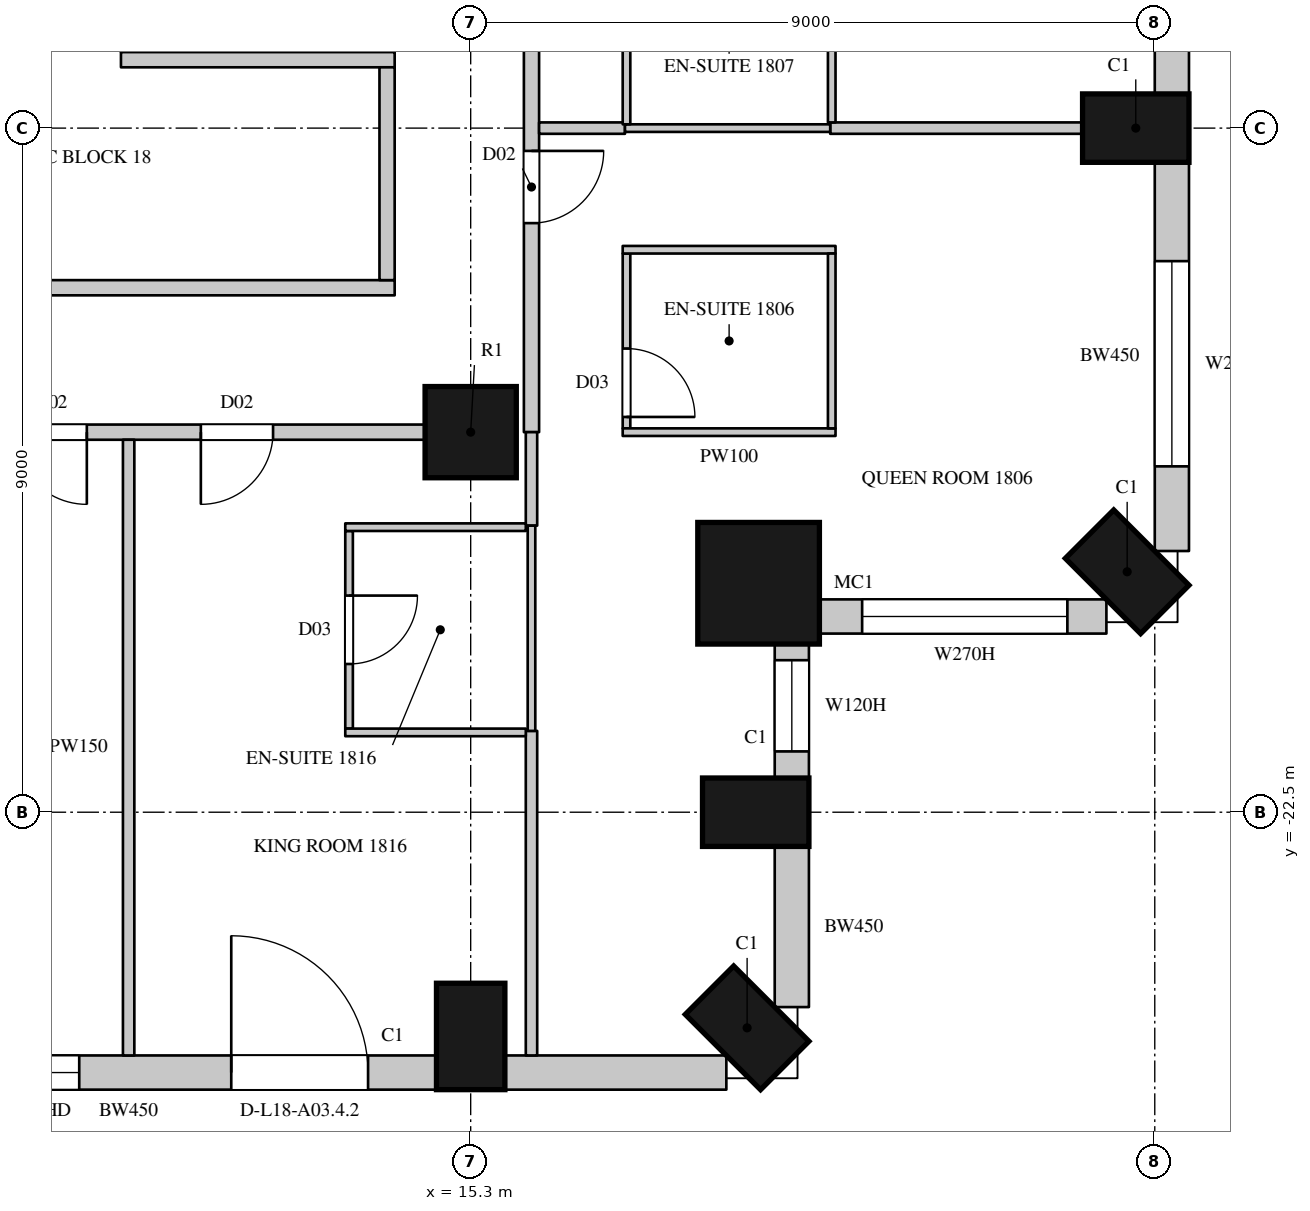
"""IFC4 building model, lengths in metres.
Left out: names, types, materials, properties, quantities, classifications, styles, units other than length and angle.
Written with IfcOpenShell. Run it as: python <this file> out.ifc"""

import sys

from ifc_helpers import new_model, si_unit, direction, frame, frame_2d, origin, origin_2d, place, context, subcontext, project, spatial, rectangle, circle, extrude, element, fill, save


model = new_model("IFC4")
c1 = context("Model", 3, precision=1e-05, world=origin(), true_north=direction((0.0, 1.0)))
c2 = subcontext(c1, "Body", "Model", "MODEL_VIEW")
j1 = project(units=[si_unit("LENGTHUNIT", "METRE"), si_unit("PLANEANGLEUNIT", "RADIAN")], contexts=[c1])
p1 = place(None, origin())
s1 = spatial("IfcSite", under=j1, at=p1, CompositionType="ELEMENT")
p2 = place(p1, origin())
s2 = spatial("IfcBuilding", under=s1, at=p2, CompositionType="ELEMENT")
p3 = place(p2, frame((0.0, 0.0, 95.1)))
s3 = spatial("IfcBuildingStorey", under=s2, at=p3, CompositionType="ELEMENT", Elevation=95.1)
for number, where, z_axis, x_axis in (
    (1, (15.3, -25.45, 0.0), (0.0, 0.0, 1.0), (1.0, 0.0, 0.0)),
    (2, (18.937, -25.337, 0.0), (0.0, 0.0, 1.0), (0.707, 0.707, 0.0)),
    (3, (19.05, -22.5, 0.0), (0.0, 0.0, 1.0), (0.0, 1.0, 0.0)),
):
    element("IfcColumn", number, at=place(p3, frame(where, z_axis=z_axis, x_axis=x_axis)), inside=s3, PredefinedType="COLUMN", context=c2, shape_type="SweptSolid", body=[
        extrude(rectangle(XDim=0.9, YDim=1.4, at=origin_2d()), origin(), (0.0, 0.0, 1.0), 3.6),
    ])
p4 = place(p3, frame((19.088, -19.488, 0.0), z_axis=(0.0, 0.0, 1.0), x_axis=(1.0, 0.0, 0.0)))
e4 = element("IfcColumn", 4, at=p4, inside=s3, PredefinedType="COLUMN", context=c2, shape_type="SweptSolid", body=[
    extrude(circle(Radius=0.8, at=origin_2d()), origin(), (0.0, 0.0, 1.0), 3.6),
])
for number, where, z_axis, x_axis in (
    (5, (23.937, -19.337, 0.0), (0.0, 0.0, 1.0), (0.707, 0.707, 0.0)),
    (6, (24.05, -13.5, 0.0), (0.0, 0.0, 1.0), (0.0, 1.0, 0.0)),
):
    element("IfcColumn", number, at=place(p3, frame(where, z_axis=z_axis, x_axis=x_axis)), inside=s3, PredefinedType="COLUMN", context=c2, shape_type="SweptSolid", body=[
        extrude(rectangle(XDim=0.9, YDim=1.4, at=origin_2d()), origin(), (0.0, 0.0, 1.0), 3.6),
    ])
p5 = place(p3, frame((15.3, -17.5, 0.0), z_axis=(0.0, 0.0, 1.0), x_axis=(1.0, 0.0, 0.0)))
e7 = element("IfcColumn", 7, at=p5, inside=s3, PredefinedType="COLUMN", context=c2, shape_type="SweptSolid", body=[
    extrude(circle(Radius=0.6, at=origin_2d()), origin(), (0.0, 0.0, 1.0), 3.6),
])
p6 = place(p3, frame((6.75, -25.925, 0.0), z_axis=(0.0, 0.0, 1.0), x_axis=(1.0, 0.0, 0.0)))
e8 = element("IfcWall", 8, at=p6, inside=s3, PredefinedType="SOLIDWALL", context=c2, shape_type="SweptSolid", body=[
    extrude(rectangle(XDim=8.1, YDim=0.45, at=frame_2d((4.05, 0.0))), origin(), (0.0, 0.0, 1.0), 3.3),
])
p7 = place(p6, frame((0.2, 0.0, 0.0)))
e9 = element("IfcOpeningElement", 9, at=p7, cuts=e8, PredefinedType="OPENING", context=c2, shape_type="SweptSolid", body=[
    extrude(rectangle(XDim=1.8, YDim=2.4, at=frame_2d((0.9, 1.2))), frame((0.0, 0.235, 0.0), z_axis=(0.0, -1.0, 0.0), x_axis=(1.0, 0.0, 0.0)), (0.0, 0.0, 1.0), 0.47),
])
p8 = place(p6, frame((2.2, 0.0, 1.05)))
e10 = element("IfcOpeningElement", 10, at=p8, cuts=e8, PredefinedType="OPENING", context=c2, shape_type="SweptSolid", body=[
    extrude(rectangle(XDim=1.2, YDim=2.0, at=frame_2d((0.6, 1.0))), frame((0.0, 0.235, 0.0), z_axis=(0.0, -1.0, 0.0), x_axis=(1.0, 0.0, 0.0)), (0.0, 0.0, 1.0), 0.47),
])
p9 = place(p6, frame((5.4, 0.0, 0.0)))
e11 = element("IfcOpeningElement", 11, at=p9, cuts=e8, PredefinedType="OPENING", context=c2, shape_type="SweptSolid", body=[
    extrude(rectangle(XDim=1.8, YDim=2.4, at=frame_2d((0.9, 1.2))), frame((0.0, 0.235, 0.0), z_axis=(0.0, -1.0, 0.0), x_axis=(1.0, 0.0, 0.0)), (0.0, 0.0, 1.0), 0.47),
])
p10 = place(p3, frame((15.75, -25.925, 0.0), z_axis=(0.0, 0.0, 1.0), x_axis=(1.0, 0.0, 0.0)))
e12 = element("IfcWall", 12, at=p10, inside=s3, PredefinedType="SOLIDWALL", context=c2, shape_type="SweptSolid", body=[
    extrude(rectangle(XDim=2.914, YDim=0.45, at=frame_2d((1.457, 0.0))), origin(), (0.0, 0.0, 1.0), 3.3),
])
p11 = place(p3, frame((19.525, -25.064, 0.0), z_axis=(0.0, 0.0, 1.0), x_axis=(0.0, 1.0, 0.0)))
e13 = element("IfcWall", 13, at=p11, inside=s3, PredefinedType="SOLIDWALL", context=c2, shape_type="SweptSolid", body=[
    extrude(rectangle(XDim=2.114, YDim=0.45, at=frame_2d((1.057, 0.0))), origin(), (0.0, 0.0, 1.0), 3.3),
])
p12 = place(p3, frame((19.525, -22.05, 0.0), z_axis=(0.0, 0.0, 1.0), x_axis=(0.0, 1.0, 0.0)))
e14 = element("IfcWall", 14, at=p12, inside=s3, PredefinedType="SOLIDWALL", context=c2, shape_type="SweptSolid", body=[
    extrude(rectangle(XDim=1.792, YDim=0.45, at=frame_2d((0.896, 0.0))), origin(), (0.0, 0.0, 1.0), 3.3),
])
p13 = place(p12, frame((0.35, 0.0, 1.05)))
e15 = element("IfcOpeningElement", 15, at=p13, cuts=e14, PredefinedType="OPENING", context=c2, shape_type="SweptSolid", body=[
    extrude(rectangle(XDim=1.2, YDim=2.0, at=frame_2d((0.6, 1.0))), frame((0.0, 0.235, 0.0), z_axis=(0.0, -1.0, 0.0), x_axis=(1.0, 0.0, 0.0)), (0.0, 0.0, 1.0), 0.47),
])
p14 = place(p3, frame((19.858, -19.925, 0.0), z_axis=(0.0, 0.0, 1.0), x_axis=(1.0, 0.0, 0.0)))
e16 = element("IfcWall", 16, at=p14, inside=s3, PredefinedType="SOLIDWALL", context=c2, shape_type="SweptSolid", body=[
    extrude(rectangle(XDim=3.805, YDim=0.45, at=frame_2d((1.903, 0.0))), origin(), (0.0, 0.0, 1.0), 3.3),
])
p15 = place(p14, frame((0.592, 0.0, 1.05)))
e17 = element("IfcOpeningElement", 17, at=p15, cuts=e16, PredefinedType="OPENING", context=c2, shape_type="SweptSolid", body=[
    extrude(rectangle(XDim=2.7, YDim=2.0, at=frame_2d((1.35, 1.0))), frame((0.0, 0.235, 0.0), z_axis=(0.0, -1.0, 0.0), x_axis=(1.0, 0.0, 0.0)), (0.0, 0.0, 1.0), 0.47),
])
p16 = place(p3, frame((24.525, -19.064, 0.0), z_axis=(0.0, 0.0, 1.0), x_axis=(0.0, 1.0, 0.0)))
e18 = element("IfcWall", 18, at=p16, inside=s3, PredefinedType="SOLIDWALL", context=c2, shape_type="SweptSolid", body=[
    extrude(rectangle(XDim=5.114, YDim=0.45, at=frame_2d((2.557, 0.0))), origin(), (0.0, 0.0, 1.0), 3.3),
])
p17 = place(p16, frame((1.114, 0.0, 1.05)))
e19 = element("IfcOpeningElement", 19, at=p17, cuts=e18, PredefinedType="OPENING", context=c2, shape_type="SweptSolid", body=[
    extrude(rectangle(XDim=2.7, YDim=2.0, at=frame_2d((1.35, 1.0))), frame((0.0, 0.235, 0.0), z_axis=(0.0, -1.0, 0.0), x_axis=(1.0, 0.0, 0.0)), (0.0, 0.0, 1.0), 0.47),
])
p18 = place(p3, frame((24.525, -13.05, 0.0), z_axis=(0.0, 0.0, 1.0), x_axis=(0.0, 1.0, 0.0)))
e20 = element("IfcWall", 20, at=p18, inside=s3, PredefinedType="SOLIDWALL", context=c2, shape_type="SweptSolid", body=[
    extrude(rectangle(XDim=8.1, YDim=0.45, at=frame_2d((4.05, 0.0))), origin(), (0.0, 0.0, 1.0), 3.3),
])
p19 = place(p18, frame((0.9, 0.0, 0.0)))
e21 = element("IfcOpeningElement", 21, at=p19, cuts=e20, PredefinedType="OPENING", context=c2, shape_type="SweptSolid", body=[
    extrude(rectangle(XDim=1.8, YDim=2.4, at=frame_2d((0.9, 1.2))), frame((0.0, 0.235, 0.0), z_axis=(0.0, -1.0, 0.0), x_axis=(1.0, 0.0, 0.0)), (0.0, 0.0, 1.0), 0.47),
])
p20 = place(p18, frame((4.7, 0.0, 0.0)))
e22 = element("IfcOpeningElement", 22, at=p20, cuts=e20, PredefinedType="OPENING", context=c2, shape_type="SweptSolid", body=[
    extrude(rectangle(XDim=1.8, YDim=2.4, at=frame_2d((0.9, 1.2))), frame((0.0, 0.235, 0.0), z_axis=(0.0, -1.0, 0.0), x_axis=(1.0, 0.0, 0.0)), (0.0, 0.0, 1.0), 0.47),
])
p21 = place(p18, frame((6.7, 0.0, 1.05)))
e23 = element("IfcOpeningElement", 23, at=p21, cuts=e20, PredefinedType="OPENING", context=c2, shape_type="SweptSolid", body=[
    extrude(rectangle(XDim=1.2, YDim=2.0, at=frame_2d((0.6, 1.0))), frame((0.0, 0.235, 0.0), z_axis=(0.0, -1.0, 0.0), x_axis=(1.0, 0.0, 0.0)), (0.0, 0.0, 1.0), 0.47),
])
p22 = place(p3, frame((6.9, -17.5, 0.0), z_axis=(0.0, 0.0, 1.0), x_axis=(1.0, 0.0, 0.0)))
e24 = element("IfcWall", 24, at=p22, inside=s3, PredefinedType="PARTITIONING", context=c2, shape_type="SweptSolid", body=[
    extrude(rectangle(XDim=7.8, YDim=0.2, at=frame_2d((3.9, 0.0))), origin(), (0.0, 0.0, 1.0), 2.75),
])
p23 = place(p22, frame((2.4, 0.0, 0.0)))
e25 = element("IfcOpeningElement", 25, at=p23, cuts=e24, PredefinedType="OPENING", context=c2, shape_type="SweptSolid", body=[
    extrude(rectangle(XDim=0.95, YDim=2.2, at=frame_2d((0.475, 1.1))), frame((0.0, 0.11, 0.0), z_axis=(0.0, -1.0, 0.0), x_axis=(1.0, 0.0, 0.0)), (0.0, 0.0, 1.0), 0.22),
])
p24 = place(p22, frame((4.85, 0.0, 0.0)))
e26 = element("IfcOpeningElement", 26, at=p24, cuts=e24, PredefinedType="OPENING", context=c2, shape_type="SweptSolid", body=[
    extrude(rectangle(XDim=0.95, YDim=2.2, at=frame_2d((0.475, 1.1))), frame((0.0, 0.11, 0.0), z_axis=(0.0, -1.0, 0.0), x_axis=(1.0, 0.0, 0.0)), (0.0, 0.0, 1.0), 0.22),
])
p25 = place(p3, frame((0.1, -15.6, 0.0), z_axis=(0.0, 0.0, 1.0), x_axis=(1.0, 0.0, 0.0)))
e27 = element("IfcWall", 27, at=p25, inside=s3, PredefinedType="PARTITIONING", context=c2, shape_type="SweptSolid", body=[
    extrude(rectangle(XDim=14.2, YDim=0.2, at=frame_2d((7.1, 0.0))), origin(), (0.0, 0.0, 1.0), 3.3),
])
p26 = place(p3, frame((10.699, -12.6, 0.0), z_axis=(0.0, 0.0, 1.0), x_axis=(1.0, 0.0, 0.0)))
e28 = element("IfcWall", 28, at=p26, inside=s3, PredefinedType="PARTITIONING", context=c2, shape_type="SweptSolid", body=[
    extrude(rectangle(XDim=3.601, YDim=0.2, at=frame_2d((1.801, 0.0))), origin(), (0.0, 0.0, 1.0), 3.3),
])
p27 = place(p3, frame((14.2, -15.5, 0.0), z_axis=(0.0, 0.0, 1.0), x_axis=(0.0, 1.0, 0.0)))
e29 = element("IfcWall", 29, at=p27, inside=s3, PredefinedType="PARTITIONING", context=c2, shape_type="SweptSolid", body=[
    extrude(rectangle(XDim=2.8, YDim=0.2, at=frame_2d((1.4, 0.0))), origin(), (0.0, 0.0, 1.0), 3.3),
])
p28 = place(p3, frame((16.1, -17.5, 0.0), z_axis=(0.0, 0.0, 1.0), x_axis=(0.0, 1.0, 0.0)))
e30 = element("IfcWall", 30, at=p28, inside=s3, PredefinedType="PARTITIONING", context=c2, shape_type="SweptSolid", body=[
    extrude(rectangle(XDim=12.75, YDim=0.2, at=frame_2d((6.375, 0.0))), origin(), (0.0, 0.0, 1.0), 3.3),
])
p29 = place(p28, frame((2.75, 0.0, 0.0)))
e31 = element("IfcOpeningElement", 31, at=p29, cuts=e30, PredefinedType="OPENING", context=c2, shape_type="SweptSolid", body=[
    extrude(rectangle(XDim=0.95, YDim=2.2, at=frame_2d((0.475, 1.1))), frame((0.0, 0.11, 0.0), z_axis=(0.0, -1.0, 0.0), x_axis=(1.0, 0.0, 0.0)), (0.0, 0.0, 1.0), 0.22),
])
p30 = place(p28, frame((6.95, 0.0, 0.0)))
e32 = element("IfcOpeningElement", 32, at=p30, cuts=e30, PredefinedType="OPENING", context=c2, shape_type="SweptSolid", body=[
    extrude(rectangle(XDim=0.95, YDim=2.2, at=frame_2d((0.475, 1.1))), frame((0.0, 0.11, 0.0), z_axis=(0.0, -1.0, 0.0), x_axis=(1.0, 0.0, 0.0)), (0.0, 0.0, 1.0), 0.22),
])
p31 = place(p28, frame((11.4, 0.0, 0.0)))
e33 = element("IfcOpeningElement", 33, at=p31, cuts=e30, PredefinedType="OPENING", context=c2, shape_type="SweptSolid", body=[
    extrude(rectangle(XDim=0.95, YDim=2.2, at=frame_2d((0.475, 1.1))), frame((0.0, 0.11, 0.0), z_axis=(0.0, -1.0, 0.0), x_axis=(1.0, 0.0, 0.0)), (0.0, 0.0, 1.0), 0.22),
])
p32 = place(p3, frame((10.8, -25.7, 0.0), z_axis=(0.0, 0.0, 1.0), x_axis=(0.0, 1.0, 0.0)))
e34 = element("IfcWall", 34, at=p32, inside=s3, PredefinedType="PARTITIONING", context=c2, shape_type="SweptSolid", body=[
    extrude(rectangle(XDim=8.1, YDim=0.15, at=frame_2d((4.05, 0.0))), origin(), (0.0, 0.0, 1.0), 2.65),
])
p33 = place(p3, frame((16.1, -25.7, 0.0), z_axis=(0.0, 0.0, 1.0), x_axis=(0.0, 1.0, 0.0)))
e35 = element("IfcWall", 35, at=p33, inside=s3, PredefinedType="PARTITIONING", context=c2, shape_type="SweptSolid", body=[
    extrude(rectangle(XDim=4.27, YDim=0.15, at=frame_2d((2.135, 0.0))), origin(), (0.0, 0.0, 1.0), 3.3),
])
p34 = place(p3, frame((16.1, -18.73, 0.0), z_axis=(0.0, 0.0, 1.0), x_axis=(0.0, 1.0, 0.0)))
e36 = element("IfcWall", 36, at=p34, inside=s3, PredefinedType="PARTITIONING", context=c2, shape_type="SweptSolid", body=[
    extrude(rectangle(XDim=1.23, YDim=0.15, at=frame_2d((0.615, 0.0))), origin(), (0.0, 0.0, 1.0), 3.3),
])
p35 = place(p3, frame((16.2, -13.5, 0.0), z_axis=(0.0, 0.0, 1.0), x_axis=(1.0, 0.0, 0.0)))
e37 = element("IfcWall", 37, at=p35, inside=s3, PredefinedType="PARTITIONING", context=c2, shape_type="SweptSolid", body=[
    extrude(rectangle(XDim=1.13, YDim=0.15, at=frame_2d((0.565, 0.0))), origin(), (0.0, 0.0, 1.0), 3.3),
])
p36 = place(p3, frame((20.03, -13.5, 0.0), z_axis=(0.0, 0.0, 1.0), x_axis=(1.0, 0.0, 0.0)))
e38 = element("IfcWall", 38, at=p36, inside=s3, PredefinedType="PARTITIONING", context=c2, shape_type="SweptSolid", body=[
    extrude(rectangle(XDim=3.32, YDim=0.15, at=frame_2d((1.66, 0.0))), origin(), (0.0, 0.0, 1.0), 3.3),
])
p37 = place(p3, frame((13.7, -21.4, 0.0), z_axis=(0.0, 0.0, 1.0), x_axis=(0.0, 1.0, 0.0)))
e39 = element("IfcWall", 39, at=p37, inside=s3, PredefinedType="PARTITIONING", context=c2, shape_type="SweptSolid", body=[
    extrude(rectangle(XDim=2.6, YDim=0.1, at=frame_2d((1.3, 0.0))), origin(), (0.0, 0.0, 1.0), 3.3),
])
p38 = place(p37, frame((0.85, 0.0, 0.0)))
e40 = element("IfcOpeningElement", 40, at=p38, cuts=e39, PredefinedType="OPENING", context=c2, shape_type="SweptSolid", body=[
    extrude(rectangle(XDim=0.9, YDim=2.2, at=frame_2d((0.45, 1.1))), frame((0.0, 0.06, 0.0), z_axis=(0.0, -1.0, 0.0), x_axis=(1.0, 0.0, 0.0)), (0.0, 0.0, 1.0), 0.12),
])
for number, where, z_axis, x_axis in (
    (41, (13.65, -21.45, 0.0), (0.0, 0.0, 1.0), (1.0, 0.0, 0.0)),
    (42, (13.65, -18.75, 0.0), (0.0, 0.0, 1.0), (1.0, 0.0, 0.0)),
):
    element("IfcWall", number, at=place(p3, frame(where, z_axis=z_axis, x_axis=x_axis)), inside=s3, PredefinedType="PARTITIONING", context=c2, shape_type="SweptSolid", body=[
        extrude(rectangle(XDim=2.375, YDim=0.1, at=frame_2d((1.188, 0.0))), origin(), (0.0, 0.0, 1.0), 3.3),
    ])
for number, where, z_axis, x_axis in (
    (43, (16.1, -21.43, 0.0), (0.0, 0.0, 1.0), (0.0, 1.0, 0.0)),
    (44, (17.33, -13.5, 0.0), (0.0, 0.0, 1.0), (1.0, 0.0, 0.0)),
):
    element("IfcWall", number, at=place(p3, frame(where, z_axis=z_axis, x_axis=x_axis)), inside=s3, PredefinedType="PARTITIONING", context=c2, shape_type="SweptSolid", body=[
        extrude(rectangle(XDim=2.7, YDim=0.1, at=frame_2d((1.35, 0.0))), origin(), (0.0, 0.0, 1.0), 3.3),
    ])
p39 = place(p3, frame((17.35, -17.45, 0.0), z_axis=(0.0, 0.0, 1.0), x_axis=(0.0, 1.0, 0.0)))
e45 = element("IfcWall", 45, at=p39, inside=s3, PredefinedType="PARTITIONING", context=c2, shape_type="SweptSolid", body=[
    extrude(rectangle(XDim=2.3, YDim=0.1, at=frame_2d((1.15, 0.0))), origin(), (0.0, 0.0, 1.0), 3.3),
])
p40 = place(p39, frame((0.15, 0.0, 0.0)))
e46 = element("IfcOpeningElement", 46, at=p40, cuts=e45, PredefinedType="OPENING", context=c2, shape_type="SweptSolid", body=[
    extrude(rectangle(XDim=0.9, YDim=2.2, at=frame_2d((0.45, 1.1))), frame((0.0, 0.06, 0.0), z_axis=(0.0, -1.0, 0.0), x_axis=(1.0, 0.0, 0.0)), (0.0, 0.0, 1.0), 0.12),
])
for number, where, z_axis, x_axis in (
    (47, (17.3, -17.5, 0.0), (0.0, 0.0, 1.0), (1.0, 0.0, 0.0)),
    (48, (17.3, -15.1, 0.0), (0.0, 0.0, 1.0), (1.0, 0.0, 0.0)),
):
    element("IfcWall", number, at=place(p3, frame(where, z_axis=z_axis, x_axis=x_axis)), inside=s3, PredefinedType="PARTITIONING", context=c2, shape_type="SweptSolid", body=[
        extrude(rectangle(XDim=2.8, YDim=0.1, at=frame_2d((1.4, 0.0))), origin(), (0.0, 0.0, 1.0), 3.3),
    ])
p41 = place(p3, frame((17.35, -13.45, 0.0), z_axis=(0.0, 0.0, 1.0), x_axis=(0.0, 1.0, 0.0)))
e49 = element("IfcWall", 49, at=p41, inside=s3, PredefinedType="PARTITIONING", context=c2, shape_type="SweptSolid", body=[
    extrude(rectangle(XDim=2.296, YDim=0.1, at=frame_2d((1.148, 0.0))), origin(), (0.0, 0.0, 1.0), 3.3),
])
p42 = place(p41, frame((1.2, 0.0, 0.0)))
e50 = element("IfcOpeningElement", 50, at=p42, cuts=e49, PredefinedType="OPENING", context=c2, shape_type="SweptSolid", body=[
    extrude(rectangle(XDim=0.9, YDim=2.2, at=frame_2d((0.45, 1.1))), frame((0.0, 0.06, 0.0), z_axis=(0.0, -1.0, 0.0), x_axis=(1.0, 0.0, 0.0)), (0.0, 0.0, 1.0), 0.12),
])
p43 = place(p3, frame((20.05, -17.45, 0.0), z_axis=(0.0, 0.0, 1.0), x_axis=(0.0, 1.0, 0.0)))
e51 = element("IfcWall", 51, at=p43, inside=s3, PredefinedType="PARTITIONING", context=c2, shape_type="SweptSolid", body=[
    extrude(rectangle(XDim=2.3, YDim=0.1, at=frame_2d((1.15, 0.0))), origin(), (0.0, 0.0, 1.0), 3.3),
])
p44 = place(p3, frame((20.05, -13.425, 0.0), z_axis=(0.0, 0.0, 1.0), x_axis=(0.0, 1.0, 0.0)))
e52 = element("IfcWall", 52, at=p44, inside=s3, PredefinedType="PARTITIONING", context=c2, shape_type="SweptSolid", body=[
    extrude(rectangle(XDim=2.271, YDim=0.1, at=frame_2d((1.135, 0.0))), origin(), (0.0, 0.0, 1.0), 3.3),
])
p45 = place(p8, origin())
e53 = element("IfcWindow", 53, at=p45, inside=s3, PartitioningType="SINGLE_PANEL", PredefinedType="WINDOW", context=c2, shape_type="SweptSolid", body=[
    extrude(rectangle(XDim=1.2, YDim=2.0, at=frame_2d((0.6, 1.0))), frame((0.0, 0.135, 0.0), z_axis=(0.0, -1.0, 0.0), x_axis=(1.0, 0.0, 0.0)), (0.0, 0.0, 1.0), 0.06),
])
fill(e10, e53)
p46 = place(p9, origin())
e54 = element("IfcDoor", 54, at=p46, inside=s3, OperationType="SLIDING_TO_LEFT", PredefinedType="DOOR", context=c2, shape_type="SweptSolid", body=[
    extrude(rectangle(XDim=1.8, YDim=2.4, at=frame_2d((0.9, 1.2))), frame((0.0, 0.13, 0.0), z_axis=(0.0, -1.0, 0.0), x_axis=(1.0, 0.0, 0.0)), (0.0, 0.0, 1.0), 0.05),
])
fill(e11, e54)
p47 = place(p13, origin())
e55 = element("IfcWindow", 55, at=p47, inside=s3, PartitioningType="SINGLE_PANEL", PredefinedType="WINDOW", context=c2, shape_type="SweptSolid", body=[
    extrude(rectangle(XDim=1.2, YDim=2.0, at=frame_2d((0.6, 1.0))), frame((0.0, 0.135, 0.0), z_axis=(0.0, -1.0, 0.0), x_axis=(1.0, 0.0, 0.0)), (0.0, 0.0, 1.0), 0.06),
])
fill(e15, e55)
p48 = place(p15, origin())
e56 = element("IfcWindow", 56, at=p48, inside=s3, PartitioningType="SINGLE_PANEL", PredefinedType="WINDOW", context=c2, shape_type="SweptSolid", body=[
    extrude(rectangle(XDim=2.7, YDim=2.0, at=frame_2d((1.35, 1.0))), frame((0.0, 0.135, 0.0), z_axis=(0.0, -1.0, 0.0), x_axis=(1.0, 0.0, 0.0)), (0.0, 0.0, 1.0), 0.06),
])
fill(e17, e56)
p49 = place(p17, origin())
e57 = element("IfcWindow", 57, at=p49, inside=s3, PartitioningType="SINGLE_PANEL", PredefinedType="WINDOW", context=c2, shape_type="SweptSolid", body=[
    extrude(rectangle(XDim=2.7, YDim=2.0, at=frame_2d((1.35, 1.0))), frame((0.0, 0.135, 0.0), z_axis=(0.0, -1.0, 0.0), x_axis=(1.0, 0.0, 0.0)), (0.0, 0.0, 1.0), 0.06),
])
fill(e19, e57)
p50 = place(p29, origin())
e58 = element("IfcDoor", 58, at=p50, inside=s3, OperationType="SINGLE_SWING_LEFT", PredefinedType="DOOR", context=c2, shape_type="SweptSolid", body=[
    extrude(rectangle(XDim=0.95, YDim=2.2, at=frame_2d((0.475, 1.1))), frame((0.0, 0.025, 0.0), z_axis=(0.0, -1.0, 0.0), x_axis=(1.0, 0.0, 0.0)), (0.0, 0.0, 1.0), 0.05),
])
fill(e31, e58)
p51 = place(p40, origin())
e59 = element("IfcDoor", 59, at=p51, inside=s3, OperationType="SINGLE_SWING_RIGHT", PredefinedType="DOOR", context=c2, shape_type="SweptSolid", body=[
    extrude(rectangle(XDim=0.9, YDim=2.2, at=frame_2d((0.45, 1.1))), frame((0.0, 0.025, 0.0), z_axis=(0.0, -1.0, 0.0), x_axis=(1.0, 0.0, 0.0)), (0.0, 0.0, 1.0), 0.05),
])
fill(e46, e59)
p52 = place(p23, origin())
e60 = element("IfcDoor", 60, at=p52, inside=s3, OperationType="SINGLE_SWING_LEFT", PredefinedType="DOOR", context=c2, shape_type="SweptSolid", body=[
    extrude(rectangle(XDim=0.95, YDim=2.2, at=frame_2d((0.475, 1.1))), frame((0.0, 0.025, 0.0), z_axis=(0.0, -1.0, 0.0), x_axis=(1.0, 0.0, 0.0)), (0.0, 0.0, 1.0), 0.05),
])
fill(e25, e60)
p53 = place(p24, origin())
e61 = element("IfcDoor", 61, at=p53, inside=s3, OperationType="SINGLE_SWING_RIGHT", PredefinedType="DOOR", context=c2, shape_type="SweptSolid", body=[
    extrude(rectangle(XDim=0.95, YDim=2.2, at=frame_2d((0.475, 1.1))), frame((0.0, 0.025, 0.0), z_axis=(0.0, -1.0, 0.0), x_axis=(1.0, 0.0, 0.0)), (0.0, 0.0, 1.0), 0.05),
])
fill(e26, e61)
p54 = place(p38, origin())
e62 = element("IfcDoor", 62, at=p54, inside=s3, OperationType="SINGLE_SWING_LEFT", PredefinedType="DOOR", context=c2, shape_type="SweptSolid", body=[
    extrude(rectangle(XDim=0.9, YDim=2.2, at=frame_2d((0.45, 1.1))), frame((0.0, 0.025, 0.0), z_axis=(0.0, -1.0, 0.0), x_axis=(1.0, 0.0, 0.0)), (0.0, 0.0, 1.0), 0.05),
])
fill(e40, e62)
save(model, sys.argv[1])
